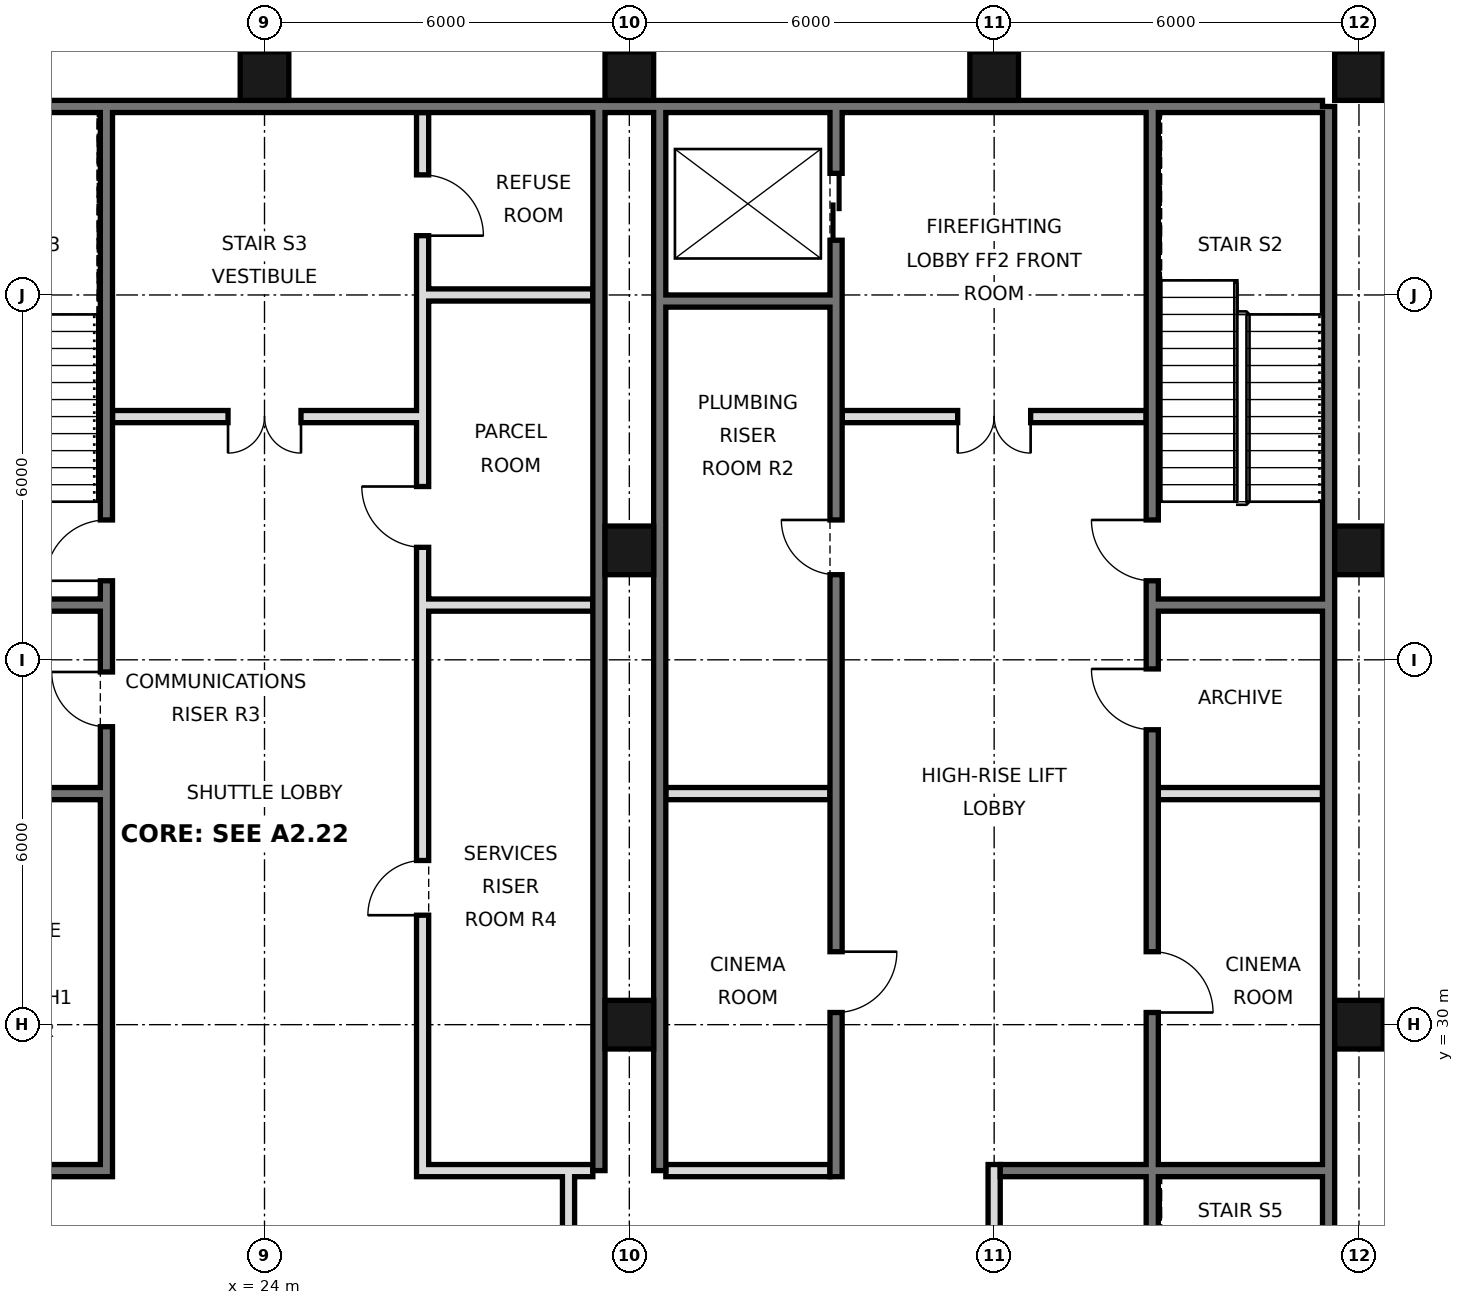
"""IFC4 building model, lengths in metres.
Left out: names, types, materials, properties, quantities, classifications, styles, units other than length and angle.
Written with IfcOpenShell. Run it as: python <this file> out.ifc"""

import sys

from ifc_helpers import new_model, si_unit, direction, frame, frame_2d, origin, origin_2d, place, context, subcontext, project, spatial, rectangle, hollow_rectangle, extrude, element, fill, save


model = new_model("IFC4")
c1 = context("Model", 3, precision=1e-05, world=origin(), true_north=direction((0.0, 1.0)))
c2 = subcontext(c1, "Body", "Model", "MODEL_VIEW")
j1 = project(units=[si_unit("LENGTHUNIT", "METRE"), si_unit("PLANEANGLEUNIT", "RADIAN")], contexts=[c1])
p1 = place(None, origin())
s1 = spatial("IfcSite", under=j1, at=p1, CompositionType="ELEMENT")
p2 = place(p1, origin())
s2 = spatial("IfcBuilding", under=s1, at=p2, CompositionType="ELEMENT")
p3 = place(p2, frame((0.0, 0.0, 85.8)))
s3 = spatial("IfcBuildingStorey", under=s2, at=p3, CompositionType="ELEMENT", Elevation=85.8)
for number, where, z_axis, x_axis in (
    (1, (24.0, 45.6, 0.0), (0.0, 0.0, 1.0), (1.0, 0.0, 0.0)),
    (2, (30.0, 30.0, 0.0), (0.0, 0.0, 1.0), (1.0, 0.0, 0.0)),
    (3, (30.0, 37.8, 0.0), (0.0, 0.0, 1.0), (1.0, 0.0, 0.0)),
    (4, (30.0, 45.6, 0.0), (0.0, 0.0, 1.0), (1.0, 0.0, 0.0)),
    (5, (36.0, 45.6, 0.0), (0.0, 0.0, 1.0), (1.0, 0.0, 0.0)),
    (6, (42.0, 30.0, 0.0), (0.0, 0.0, 1.0), (1.0, 0.0, 0.0)),
    (7, (42.0, 37.8, 0.0), (0.0, 0.0, 1.0), (1.0, 0.0, 0.0)),
    (8, (42.0, 45.6, 0.0), (0.0, 0.0, 1.0), (1.0, 0.0, 0.0)),
):
    element("IfcColumn", number, at=place(p3, frame(where, z_axis=z_axis, x_axis=x_axis)), inside=s3, PredefinedType="COLUMN", context=c2, shape_type="SweptSolid", body=[
        extrude(hollow_rectangle(XDim=0.8, YDim=0.8, WallThickness=0.06, at=origin_2d()), origin(), (0.0, 0.0, 1.0), 4.4),
    ])
p4 = place(p3, frame((41.5, 21.6, 0.0), z_axis=(0.0, 0.0, 1.0), x_axis=(0.0, 1.0, 0.0)))
e9 = element("IfcWall", 9, at=p4, inside=s3, PredefinedType="SOLIDWALL", context=c2, shape_type="SweptSolid", body=[
    extrude(rectangle(XDim=23.5, YDim=0.2, at=frame_2d((11.75, 0.0))), origin(), (0.0, 0.0, 1.0), 4.1),
])
p5 = place(p3, frame((6.6, 45.1, 0.0), z_axis=(0.0, 0.0, 1.0), x_axis=(1.0, 0.0, 0.0)))
e10 = element("IfcWall", 10, at=p5, inside=s3, PredefinedType="SOLIDWALL", context=c2, shape_type="SweptSolid", body=[
    extrude(rectangle(XDim=34.8, YDim=0.2, at=frame_2d((17.4, 0.0))), origin(), (0.0, 0.0, 1.0), 4.1),
])
for number, where, z_axis, x_axis in (
    (11, (29.5, 27.6, 0.0), (0.0, 0.0, 1.0), (0.0, 1.0, 0.0)),
    (12, (30.5, 27.6, 0.0), (0.0, 0.0, 1.0), (0.0, 1.0, 0.0)),
):
    element("IfcWall", number, at=place(p3, frame(where, z_axis=z_axis, x_axis=x_axis)), inside=s3, PredefinedType="SOLIDWALL", context=c2, shape_type="SweptSolid", body=[
        extrude(rectangle(XDim=17.5, YDim=0.2, at=frame_2d((8.75, 0.0))), origin(), (0.0, 0.0, 1.0), 4.1),
    ])
p6 = place(p3, frame((29.0, 21.6, 0.0), z_axis=(0.0, 0.0, 1.0), x_axis=(0.0, 1.0, 0.0)))
e13 = element("IfcWall", 13, at=p6, inside=s3, PredefinedType="PARTITIONING", context=c2, shape_type="SweptSolid", body=[
    extrude(rectangle(XDim=6.0, YDim=0.2, at=frame_2d((3.0, 0.0))), origin(), (0.0, 0.0, 1.0), 4.1),
])
p7 = place(p6, frame((2.1, 0.0, 0.0)))
e14 = element("IfcOpeningElement", 14, at=p7, cuts=e13, PredefinedType="OPENING", context=c2, shape_type="SweptSolid", body=[
    extrude(rectangle(XDim=1.8, YDim=2.1, at=frame_2d((0.9, 1.05))), frame((0.0, 0.11, 0.0), z_axis=(0.0, -1.0, 0.0), x_axis=(1.0, 0.0, 0.0)), (0.0, 0.0, 1.0), 0.22),
])
p8 = place(p3, frame((21.4, 27.5, 0.0), z_axis=(0.0, 0.0, 1.0), x_axis=(0.0, 1.0, 0.0)))
e15 = element("IfcWall", 15, at=p8, inside=s3, PredefinedType="SOLIDWALL", context=c2, shape_type="SweptSolid", body=[
    extrude(rectangle(XDim=17.5, YDim=0.2, at=frame_2d((8.75, 0.0))), origin(), (0.0, 0.0, 1.0), 4.1),
])
p9 = place(p8, frame((9.8, 0.0, 0.0)))
e16 = element("IfcOpeningElement", 16, at=p9, cuts=e15, PredefinedType="OPENING", context=c2, shape_type="SweptSolid", body=[
    extrude(rectangle(XDim=1.0, YDim=2.1, at=frame_2d((0.5, 1.05))), frame((0.0, 0.11, 0.0), z_axis=(0.0, -1.0, 0.0), x_axis=(1.0, 0.0, 0.0)), (0.0, 0.0, 1.0), 0.22),
])
p10 = place(p8, frame((7.4, 0.0, 0.0)))
e17 = element("IfcOpeningElement", 17, at=p10, cuts=e15, PredefinedType="OPENING", context=c2, shape_type="SweptSolid", body=[
    extrude(rectangle(XDim=0.9, YDim=2.1, at=frame_2d((0.45, 1.05))), frame((0.0, 0.11, 0.0), z_axis=(0.0, -1.0, 0.0), x_axis=(1.0, 0.0, 0.0)), (0.0, 0.0, 1.0), 0.22),
])
p11 = place(p3, frame((26.6, 27.5, 0.0), z_axis=(0.0, 0.0, 1.0), x_axis=(0.0, 1.0, 0.0)))
e18 = element("IfcWall", 18, at=p11, inside=s3, PredefinedType="SOLIDWALL", context=c2, shape_type="SweptSolid", body=[
    extrude(rectangle(XDim=17.5, YDim=0.2, at=frame_2d((8.75, 0.0))), origin(), (0.0, 0.0, 1.0), 4.1),
])
p12 = place(p11, frame((4.3, 0.0, 0.0)))
e19 = element("IfcOpeningElement", 19, at=p12, cuts=e18, PredefinedType="OPENING", context=c2, shape_type="SweptSolid", body=[
    extrude(rectangle(XDim=0.9, YDim=2.1, at=frame_2d((0.45, 1.05))), frame((0.0, 0.11, 0.0), z_axis=(0.0, -1.0, 0.0), x_axis=(1.0, 0.0, 0.0)), (0.0, 0.0, 1.0), 0.22),
])
p13 = place(p11, frame((10.35, 0.0, 0.0)))
e20 = element("IfcOpeningElement", 20, at=p13, cuts=e18, PredefinedType="OPENING", context=c2, shape_type="SweptSolid", body=[
    extrude(rectangle(XDim=1.0, YDim=2.1, at=frame_2d((0.5, 1.05))), frame((0.0, 0.11, 0.0), z_axis=(0.0, -1.0, 0.0), x_axis=(1.0, 0.0, 0.0)), (0.0, 0.0, 1.0), 0.22),
])
p14 = place(p11, frame((15.475, 0.0, 0.0)))
e21 = element("IfcOpeningElement", 21, at=p14, cuts=e18, PredefinedType="OPENING", context=c2, shape_type="SweptSolid", body=[
    extrude(rectangle(XDim=1.0, YDim=2.1, at=frame_2d((0.5, 1.05))), frame((0.0, 0.11, 0.0), z_axis=(0.0, -1.0, 0.0), x_axis=(1.0, 0.0, 0.0)), (0.0, 0.0, 1.0), 0.22),
])
p15 = place(p3, frame((33.4, 27.5, 0.0), z_axis=(0.0, 0.0, 1.0), x_axis=(0.0, 1.0, 0.0)))
e22 = element("IfcWall", 22, at=p15, inside=s3, PredefinedType="SOLIDWALL", context=c2, shape_type="SweptSolid", body=[
    extrude(rectangle(XDim=17.5, YDim=0.2, at=frame_2d((8.75, 0.0))), origin(), (0.0, 0.0, 1.0), 4.1),
])
p16 = place(p15, frame((15.4, 0.0, 0.0)))
e23 = element("IfcOpeningElement", 23, at=p16, cuts=e22, PredefinedType="OPENING", context=c2, shape_type="SweptSolid", body=[
    extrude(rectangle(XDim=1.1, YDim=2.1, at=frame_2d((0.55, 1.05))), frame((0.0, 0.11, 0.0), z_axis=(0.0, -1.0, 0.0), x_axis=(1.0, 0.0, 0.0)), (0.0, 0.0, 1.0), 0.22),
])
p17 = place(p15, frame((2.7, 0.0, 0.0)))
e24 = element("IfcOpeningElement", 24, at=p17, cuts=e22, PredefinedType="OPENING", context=c2, shape_type="SweptSolid", body=[
    extrude(rectangle(XDim=1.0, YDim=2.1, at=frame_2d((0.5, 1.05))), frame((0.0, 0.11, 0.0), z_axis=(0.0, -1.0, 0.0), x_axis=(1.0, 0.0, 0.0)), (0.0, 0.0, 1.0), 0.22),
])
p18 = place(p15, frame((9.9, 0.0, 0.0)))
e25 = element("IfcOpeningElement", 25, at=p18, cuts=e22, PredefinedType="OPENING", context=c2, shape_type="SweptSolid", body=[
    extrude(rectangle(XDim=0.9, YDim=2.1, at=frame_2d((0.45, 1.05))), frame((0.0, 0.11, 0.0), z_axis=(0.0, -1.0, 0.0), x_axis=(1.0, 0.0, 0.0)), (0.0, 0.0, 1.0), 0.22),
])
p19 = place(p3, frame((36.0, 21.6, 0.0), z_axis=(0.0, 0.0, 1.0), x_axis=(0.0, 1.0, 0.0)))
e26 = element("IfcWall", 26, at=p19, inside=s3, PredefinedType="PARTITIONING", context=c2, shape_type="SweptSolid", body=[
    extrude(rectangle(XDim=6.1, YDim=0.2, at=frame_2d((3.05, 0.0))), origin(), (0.0, 0.0, 1.0), 4.1),
])
p20 = place(p3, frame((38.6, 21.6, 0.0), z_axis=(0.0, 0.0, 1.0), x_axis=(0.0, 1.0, 0.0)))
e27 = element("IfcWall", 27, at=p20, inside=s3, PredefinedType="SOLIDWALL", context=c2, shape_type="SweptSolid", body=[
    extrude(rectangle(XDim=23.4, YDim=0.2, at=frame_2d((11.7, 0.0))), origin(), (0.0, 0.0, 1.0), 4.1),
])
p21 = place(p20, frame((8.6, 0.0, 0.0)))
e28 = element("IfcOpeningElement", 28, at=p21, cuts=e27, PredefinedType="OPENING", context=c2, shape_type="SweptSolid", body=[
    extrude(rectangle(XDim=1.0, YDim=2.1, at=frame_2d((0.5, 1.05))), frame((0.0, 0.11, 0.0), z_axis=(0.0, -1.0, 0.0), x_axis=(1.0, 0.0, 0.0)), (0.0, 0.0, 1.0), 0.22),
])
p22 = place(p20, frame((13.25, 0.0, 0.0)))
e29 = element("IfcOpeningElement", 29, at=p22, cuts=e27, PredefinedType="OPENING", context=c2, shape_type="SweptSolid", body=[
    extrude(rectangle(XDim=1.0, YDim=2.1, at=frame_2d((0.5, 1.05))), frame((0.0, 0.11, 0.0), z_axis=(0.0, -1.0, 0.0), x_axis=(1.0, 0.0, 0.0)), (0.0, 0.0, 1.0), 0.22),
])
p23 = place(p20, frame((15.7, 0.0, 0.0)))
e30 = element("IfcOpeningElement", 30, at=p23, cuts=e27, PredefinedType="OPENING", context=c2, shape_type="SweptSolid", body=[
    extrude(rectangle(XDim=1.0, YDim=2.1, at=frame_2d((0.5, 1.05))), frame((0.0, 0.11, 0.0), z_axis=(0.0, -1.0, 0.0), x_axis=(1.0, 0.0, 0.0)), (0.0, 0.0, 1.0), 0.22),
])
p24 = place(p20, frame((0.175, 0.0, 0.0)))
e31 = element("IfcOpeningElement", 31, at=p24, cuts=e27, PredefinedType="OPENING", context=c2, shape_type="SweptSolid", body=[
    extrude(rectangle(XDim=0.9, YDim=2.1, at=frame_2d((0.45, 1.05))), frame((0.0, 0.11, 0.0), z_axis=(0.0, -1.0, 0.0), x_axis=(1.0, 0.0, 0.0)), (0.0, 0.0, 1.0), 0.22),
])
for number, where, z_axis, x_axis in (
    (32, (18.6, 27.6, 0.0), (0.0, 0.0, 1.0), (1.0, 0.0, 0.0)),
    (33, (26.7, 27.6, 0.0), (0.0, 0.0, 1.0), (1.0, 0.0, 0.0)),
):
    element("IfcWall", number, at=place(p3, frame(where, z_axis=z_axis, x_axis=x_axis)), inside=s3, PredefinedType="SOLIDWALL", context=c2, shape_type="SweptSolid", body=[
        extrude(rectangle(XDim=2.7, YDim=0.2, at=frame_2d((1.35, 0.0))), origin(), (0.0, 0.0, 1.0), 4.1),
    ])
p25 = place(p3, frame((30.6, 27.6, 0.0), z_axis=(0.0, 0.0, 1.0), x_axis=(1.0, 0.0, 0.0)))
e34 = element("IfcWall", 34, at=p25, inside=s3, PredefinedType="PARTITIONING", context=c2, shape_type="SweptSolid", body=[
    extrude(rectangle(XDim=2.7, YDim=0.2, at=frame_2d((1.35, 0.0))), origin(), (0.0, 0.0, 1.0), 4.1),
])
p26 = place(p3, frame((36.1, 27.6, 0.0), z_axis=(0.0, 0.0, 1.0), x_axis=(1.0, 0.0, 0.0)))
e35 = element("IfcWall", 35, at=p26, inside=s3, PredefinedType="SOLIDWALL", context=c2, shape_type="SweptSolid", body=[
    extrude(rectangle(XDim=5.3, YDim=0.2, at=frame_2d((2.65, 0.0))), origin(), (0.0, 0.0, 1.0), 4.1),
])
for number, where, z_axis, x_axis in (
    (36, (18.6, 33.8, 0.0), (0.0, 0.0, 1.0), (1.0, 0.0, 0.0)),
    (37, (30.6, 33.8, 0.0), (0.0, 0.0, 1.0), (1.0, 0.0, 0.0)),
):
    element("IfcWall", number, at=place(p3, frame(where, z_axis=z_axis, x_axis=x_axis)), inside=s3, PredefinedType="SOLIDWALL", context=c2, shape_type="SweptSolid", body=[
        extrude(rectangle(XDim=2.7, YDim=0.2, at=frame_2d((1.35, 0.0))), origin(), (0.0, 0.0, 1.0), 4.1),
    ])
p27 = place(p3, frame((38.7, 33.8, 0.0), z_axis=(0.0, 0.0, 1.0), x_axis=(1.0, 0.0, 0.0)))
e38 = element("IfcWall", 38, at=p27, inside=s3, PredefinedType="PARTITIONING", context=c2, shape_type="SweptSolid", body=[
    extrude(rectangle(XDim=2.7, YDim=0.2, at=frame_2d((1.35, 0.0))), origin(), (0.0, 0.0, 1.0), 4.1),
])
for number, where, z_axis, x_axis in (
    (39, (18.6, 36.9, 0.0), (0.0, 0.0, 1.0), (1.0, 0.0, 0.0)),
    (40, (26.7, 36.9, 0.0), (0.0, 0.0, 1.0), (1.0, 0.0, 0.0)),
    (41, (38.7, 36.9, 0.0), (0.0, 0.0, 1.0), (1.0, 0.0, 0.0)),
):
    element("IfcWall", number, at=place(p3, frame(where, z_axis=z_axis, x_axis=x_axis)), inside=s3, PredefinedType="SOLIDWALL", context=c2, shape_type="SweptSolid", body=[
        extrude(rectangle(XDim=2.7, YDim=0.2, at=frame_2d((1.35, 0.0))), origin(), (0.0, 0.0, 1.0), 4.1),
    ])
p28 = place(p3, frame((21.5, 40.0, 0.0), z_axis=(0.0, 0.0, 1.0), x_axis=(1.0, 0.0, 0.0)))
e42 = element("IfcWall", 42, at=p28, inside=s3, PredefinedType="PARTITIONING", context=c2, shape_type="SweptSolid", body=[
    extrude(rectangle(XDim=5.0, YDim=0.2, at=frame_2d((2.5, 0.0))), origin(), (0.0, 0.0, 1.0), 4.1),
])
p29 = place(p28, frame((1.9, 0.0, 0.0)))
e43 = element("IfcOpeningElement", 43, at=p29, cuts=e42, PredefinedType="OPENING", context=c2, shape_type="SweptSolid", body=[
    extrude(rectangle(XDim=1.2, YDim=2.1, at=frame_2d((0.6, 1.05))), frame((0.0, 0.11, 0.0), z_axis=(0.0, -1.0, 0.0), x_axis=(1.0, 0.0, 0.0)), (0.0, 0.0, 1.0), 0.22),
])
p30 = place(p3, frame((33.5, 40.0, 0.0), z_axis=(0.0, 0.0, 1.0), x_axis=(1.0, 0.0, 0.0)))
e44 = element("IfcWall", 44, at=p30, inside=s3, PredefinedType="PARTITIONING", context=c2, shape_type="SweptSolid", body=[
    extrude(rectangle(XDim=5.0, YDim=0.2, at=frame_2d((2.5, 0.0))), origin(), (0.0, 0.0, 1.0), 4.1),
])
p31 = place(p30, frame((1.9, 0.0, 0.0)))
e45 = element("IfcOpeningElement", 45, at=p31, cuts=e44, PredefinedType="OPENING", context=c2, shape_type="SweptSolid", body=[
    extrude(rectangle(XDim=1.2, YDim=2.1, at=frame_2d((0.6, 1.05))), frame((0.0, 0.11, 0.0), z_axis=(0.0, -1.0, 0.0), x_axis=(1.0, 0.0, 0.0)), (0.0, 0.0, 1.0), 0.22),
])
p32 = place(p3, frame((30.6, 41.9, 0.0), z_axis=(0.0, 0.0, 1.0), x_axis=(1.0, 0.0, 0.0)))
e46 = element("IfcWall", 46, at=p32, inside=s3, PredefinedType="SOLIDWALL", context=c2, shape_type="SweptSolid", body=[
    extrude(rectangle(XDim=2.7, YDim=0.2, at=frame_2d((1.35, 0.0))), origin(), (0.0, 0.0, 1.0), 4.1),
])
p33 = place(p3, frame((26.7, 42.0, 0.0), z_axis=(0.0, 0.0, 1.0), x_axis=(1.0, 0.0, 0.0)))
e47 = element("IfcWall", 47, at=p33, inside=s3, PredefinedType="PARTITIONING", context=c2, shape_type="SweptSolid", body=[
    extrude(rectangle(XDim=2.7, YDim=0.2, at=frame_2d((1.35, 0.0))), origin(), (0.0, 0.0, 1.0), 4.1),
])
p34 = place(p29, frame((1.2, 0.0, 0.0), z_axis=(0.0, 0.0, 1.0), x_axis=(-1.0, 0.0, 0.0)))
e48 = element("IfcDoor", 48, at=p34, inside=s3, OperationType="DOUBLE_DOOR_SINGLE_SWING", PredefinedType="DOOR", context=c2, shape_type="SweptSolid", body=[
    extrude(rectangle(XDim=1.2, YDim=2.1, at=frame_2d((0.6, 1.05))), frame((0.0, 0.025, 0.0), z_axis=(0.0, -1.0, 0.0), x_axis=(1.0, 0.0, 0.0)), (0.0, 0.0, 1.0), 0.05),
])
fill(e43, e48)
p35 = place(p31, frame((1.2, 0.0, 0.0), z_axis=(0.0, 0.0, 1.0), x_axis=(-1.0, 0.0, 0.0)))
e49 = element("IfcDoor", 49, at=p35, inside=s3, OperationType="DOUBLE_DOOR_SINGLE_SWING", PredefinedType="DOOR", context=c2, shape_type="SweptSolid", body=[
    extrude(rectangle(XDim=1.2, YDim=2.1, at=frame_2d((0.6, 1.05))), frame((0.0, 0.025, 0.0), z_axis=(0.0, -1.0, 0.0), x_axis=(1.0, 0.0, 0.0)), (0.0, 0.0, 1.0), 0.05),
])
fill(e45, e49)
p36 = place(p16, origin())
e50 = element("IfcDoor", 50, at=p36, inside=s3, OperationType="DOUBLE_DOOR_SLIDING", PredefinedType="DOOR", context=c2, shape_type="SweptSolid", body=[
    extrude(rectangle(XDim=1.1, YDim=2.1, at=frame_2d((0.55, 1.05))), frame((0.0, 0.025, 0.0), z_axis=(0.0, -1.0, 0.0), x_axis=(1.0, 0.0, 0.0)), (0.0, 0.0, 1.0), 0.05),
])
fill(e23, e50)
p37 = place(p21, frame((1.0, 0.0, 0.0), z_axis=(0.0, 0.0, 1.0), x_axis=(-1.0, 0.0, 0.0)))
e51 = element("IfcDoor", 51, at=p37, inside=s3, OperationType="SINGLE_SWING_RIGHT", PredefinedType="DOOR", context=c2, shape_type="SweptSolid", body=[
    extrude(rectangle(XDim=1.0, YDim=2.1, at=frame_2d((0.5, 1.05))), frame((0.0, 0.025, 0.0), z_axis=(0.0, -1.0, 0.0), x_axis=(1.0, 0.0, 0.0)), (0.0, 0.0, 1.0), 0.05),
])
fill(e28, e51)
p38 = place(p22, frame((1.0, 0.0, 0.0), z_axis=(0.0, 0.0, 1.0), x_axis=(-1.0, 0.0, 0.0)))
e52 = element("IfcDoor", 52, at=p38, inside=s3, OperationType="SINGLE_SWING_LEFT", PredefinedType="DOOR", context=c2, shape_type="SweptSolid", body=[
    extrude(rectangle(XDim=1.0, YDim=2.1, at=frame_2d((0.5, 1.05))), frame((0.0, 0.025, 0.0), z_axis=(0.0, -1.0, 0.0), x_axis=(1.0, 0.0, 0.0)), (0.0, 0.0, 1.0), 0.05),
])
fill(e29, e52)
p39 = place(p17, origin())
e53 = element("IfcDoor", 53, at=p39, inside=s3, OperationType="SINGLE_SWING_RIGHT", PredefinedType="DOOR", context=c2, shape_type="SweptSolid", body=[
    extrude(rectangle(XDim=1.0, YDim=2.1, at=frame_2d((0.5, 1.05))), frame((0.0, 0.025, 0.0), z_axis=(0.0, -1.0, 0.0), x_axis=(1.0, 0.0, 0.0)), (0.0, 0.0, 1.0), 0.05),
])
fill(e24, e53)
p40 = place(p23, frame((1.0, 0.0, 0.0), z_axis=(0.0, 0.0, 1.0), x_axis=(-1.0, 0.0, 0.0)))
e54 = element("IfcDoor", 54, at=p40, inside=s3, OperationType="SINGLE_SWING_LEFT", PredefinedType="DOOR", context=c2, shape_type="SweptSolid", body=[
    extrude(rectangle(XDim=1.0, YDim=2.1, at=frame_2d((0.5, 1.05))), frame((0.0, 0.025, 0.0), z_axis=(0.0, -1.0, 0.0), x_axis=(1.0, 0.0, 0.0)), (0.0, 0.0, 1.0), 0.05),
])
fill(e30, e54)
p41 = place(p9, origin())
e55 = element("IfcDoor", 55, at=p41, inside=s3, OperationType="SINGLE_SWING_LEFT", PredefinedType="DOOR", context=c2, shape_type="SweptSolid", body=[
    extrude(rectangle(XDim=1.0, YDim=2.1, at=frame_2d((0.5, 1.05))), frame((0.0, 0.025, 0.0), z_axis=(0.0, -1.0, 0.0), x_axis=(1.0, 0.0, 0.0)), (0.0, 0.0, 1.0), 0.05),
])
fill(e16, e55)
p42 = place(p18, frame((0.9, 0.0, 0.0), z_axis=(0.0, 0.0, 1.0), x_axis=(-1.0, 0.0, 0.0)))
e56 = element("IfcDoor", 56, at=p42, inside=s3, OperationType="SINGLE_SWING_LEFT", PredefinedType="DOOR", context=c2, shape_type="SweptSolid", body=[
    extrude(rectangle(XDim=0.9, YDim=2.1, at=frame_2d((0.45, 1.05))), frame((0.0, 0.025, 0.0), z_axis=(0.0, -1.0, 0.0), x_axis=(1.0, 0.0, 0.0)), (0.0, 0.0, 1.0), 0.05),
])
fill(e25, e56)
p43 = place(p10, frame((0.9, 0.0, 0.0), z_axis=(0.0, 0.0, 1.0), x_axis=(-1.0, 0.0, 0.0)))
e57 = element("IfcDoor", 57, at=p43, inside=s3, OperationType="SINGLE_SWING_LEFT", PredefinedType="DOOR", context=c2, shape_type="SweptSolid", body=[
    extrude(rectangle(XDim=0.9, YDim=2.1, at=frame_2d((0.45, 1.05))), frame((0.0, 0.025, 0.0), z_axis=(0.0, -1.0, 0.0), x_axis=(1.0, 0.0, 0.0)), (0.0, 0.0, 1.0), 0.05),
])
fill(e17, e57)
p44 = place(p12, origin())
e58 = element("IfcDoor", 58, at=p44, inside=s3, OperationType="SINGLE_SWING_LEFT", PredefinedType="DOOR", context=c2, shape_type="SweptSolid", body=[
    extrude(rectangle(XDim=0.9, YDim=2.1, at=frame_2d((0.45, 1.05))), frame((0.0, 0.025, 0.0), z_axis=(0.0, -1.0, 0.0), x_axis=(1.0, 0.0, 0.0)), (0.0, 0.0, 1.0), 0.05),
])
fill(e19, e58)
p45 = place(p13, frame((1.0, 0.0, 0.0), z_axis=(0.0, 0.0, 1.0), x_axis=(-1.0, 0.0, 0.0)))
e59 = element("IfcDoor", 59, at=p45, inside=s3, OperationType="SINGLE_SWING_LEFT", PredefinedType="DOOR", context=c2, shape_type="SweptSolid", body=[
    extrude(rectangle(XDim=1.0, YDim=2.1, at=frame_2d((0.5, 1.05))), frame((0.0, 0.025, 0.0), z_axis=(0.0, -1.0, 0.0), x_axis=(1.0, 0.0, 0.0)), (0.0, 0.0, 1.0), 0.05),
])
fill(e20, e59)
p46 = place(p14, frame((1.0, 0.0, 0.0), z_axis=(0.0, 0.0, 1.0), x_axis=(-1.0, 0.0, 0.0)))
e60 = element("IfcDoor", 60, at=p46, inside=s3, OperationType="SINGLE_SWING_RIGHT", PredefinedType="DOOR", context=c2, shape_type="SweptSolid", body=[
    extrude(rectangle(XDim=1.0, YDim=2.1, at=frame_2d((0.5, 1.05))), frame((0.0, 0.025, 0.0), z_axis=(0.0, -1.0, 0.0), x_axis=(1.0, 0.0, 0.0)), (0.0, 0.0, 1.0), 0.05),
])
fill(e21, e60)
save(model, sys.argv[1])
